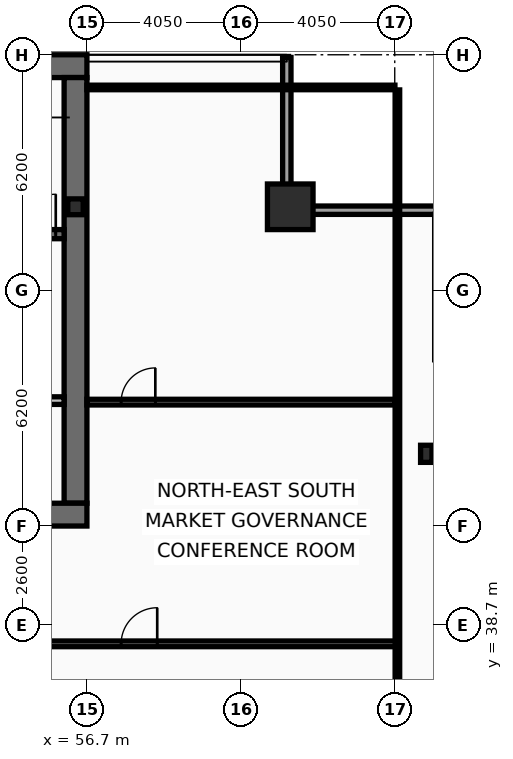
"""IFC4 building model, lengths in metres.
Left out: names, types, materials, properties, quantities, classifications, styles, units other than length and angle.
Written with IfcOpenShell. Run it as: python <this file> out.ifc"""

import sys

from ifc_helpers import new_model, si_unit, direction, frame, frame_2d, origin, origin_2d, place, context, subcontext, project, spatial, rectangle, hollow_rectangle, i_section, extrude, element, fill, save


model = new_model("IFC4")
c1 = context("Model", 3, precision=1e-05, world=origin(), true_north=direction((0.0, 1.0)))
c2 = subcontext(c1, "Body", "Model", "MODEL_VIEW")
j1 = project(units=[si_unit("LENGTHUNIT", "METRE"), si_unit("PLANEANGLEUNIT", "RADIAN")], contexts=[c1])
p1 = place(None, origin())
s1 = spatial("IfcSite", under=j1, at=p1, CompositionType="ELEMENT")
p2 = place(p1, origin())
s2 = spatial("IfcBuilding", under=s1, at=p2, CompositionType="ELEMENT")
p3 = place(p2, frame((0.0, 0.0, 228.2)))
s3 = spatial("IfcBuildingStorey", under=s2, at=p3, CompositionType="ELEMENT", Elevation=228.2)
p4 = place(p3, frame((16.2, 53.4, 0.0), z_axis=(0.0, 0.0, 1.0), x_axis=(1.0, 0.0, 0.0)))
e1 = element("IfcWall", 1, at=p4, inside=s3, PredefinedType="SHEAR", context=c2, shape_type="SweptSolid", body=[
    extrude(rectangle(XDim=40.5, YDim=0.6, at=frame_2d((20.25, 0.0))), origin(), (0.0, 0.0, 1.0), 3.44),
])
p5 = place(p3, frame((56.4, 53.1, 0.0), z_axis=(0.0, 0.0, 1.0), x_axis=(0.0, -1.0, 0.0)))
e2 = element("IfcWall", 2, at=p5, inside=s3, PredefinedType="SHEAR", context=c2, shape_type="SweptSolid", body=[
    extrude(rectangle(XDim=11.2, YDim=0.6, at=frame_2d((5.6, 0.0))), origin(), (0.0, 0.0, 1.0), 3.44),
])
p6 = place(p3, frame((56.7, 41.6, 0.0), z_axis=(0.0, 0.0, 1.0), x_axis=(-1.0, 0.0, 0.0)))
e3 = element("IfcWall", 3, at=p6, inside=s3, PredefinedType="SHEAR", context=c2, shape_type="SweptSolid", body=[
    extrude(rectangle(XDim=2.45, YDim=0.6, at=frame_2d((1.225, 0.0))), origin(), (0.0, 0.0, 1.0), 3.44),
])
p7 = place(p3, frame((48.63, 48.98, 0.0), z_axis=(0.0, 0.0, 1.0), x_axis=(1.0, 0.0, 0.0)))
e4 = element("IfcWall", 4, at=p7, inside=s3, PredefinedType="SHEAR", context=c2, shape_type="SweptSolid", body=[
    extrude(rectangle(XDim=7.47, YDim=0.24, at=frame_2d((3.735, 0.0))), origin(), (0.0, 0.0, 1.0), 3.44),
])
p8 = place(p7, frame((6.2, 0.0, 0.0)))
e5 = element("IfcOpeningElement", 5, at=p8, cuts=e4, PredefinedType="OPENING", context=c2, shape_type="SweptSolid", body=[
    extrude(rectangle(XDim=1.05, YDim=2.15, at=frame_2d((0.525, 1.075))), frame((0.0, 0.13, 0.0), z_axis=(0.0, -1.0, 0.0), x_axis=(1.0, 0.0, 0.0)), (0.0, 0.0, 1.0), 0.26),
])
p9 = place(p3, frame((62.05, 49.7, 0.0), z_axis=(0.0, 0.0, 1.0), x_axis=(1.0, 0.0, 0.0)))
e6 = element("IfcColumn", 6, at=p9, inside=s3, PredefinedType="COLUMN", context=c2, shape_type="SweptSolid", body=[
    extrude(hollow_rectangle(XDim=1.2, YDim=1.2, WallThickness=0.06, at=origin_2d()), origin(), (0.0, 0.0, 1.0), 3.6),
])
p10 = place(p3, frame((65.63, 43.2, 0.0), z_axis=(0.0, 0.0, 1.0), x_axis=(1.0, 0.0, 0.0)))
e7 = element("IfcColumn", 7, at=p10, inside=s3, PredefinedType="COLUMN", context=c2, shape_type="SweptSolid", body=[
    extrude(i_section(OverallWidth=0.3, OverallDepth=0.45, WebThickness=0.014, FlangeThickness=0.026, at=origin_2d()), origin(), (0.0, 0.0, 1.0), 3.6),
])
p11 = place(p3, frame((56.4, 49.7, 0.0), z_axis=(0.0, 0.0, 1.0), x_axis=(1.0, 0.0, 0.0)))
e8 = element("IfcColumn", 8, at=p11, inside=s3, PredefinedType="COLUMN", context=c2, shape_type="SweptSolid", body=[
    extrude(i_section(OverallWidth=0.406, OverallDepth=0.416, WebThickness=0.03, FlangeThickness=0.048, at=origin_2d()), origin(), (0.0, 0.0, 1.0), 3.6),
])
p12 = place(p3, frame((61.96, 53.63, 0.0), z_axis=(0.0, 0.0, 1.0), x_axis=(0.0, -1.0, 0.0)))
e9 = element("IfcWall", 9, at=p12, inside=s3, PredefinedType="SOLIDWALL", context=c2, shape_type="SweptSolid", body=[
    extrude(rectangle(XDim=3.91, YDim=0.22, at=frame_2d((1.955, 0.0))), origin(), (0.0, 0.0, 1.0), 2.83),
])
p13 = place(p3, frame((61.85, 49.61, 0.0), z_axis=(0.0, 0.0, 1.0), x_axis=(1.0, 0.0, 0.0)))
e10 = element("IfcWall", 10, at=p13, inside=s3, PredefinedType="SOLIDWALL", context=c2, shape_type="SweptSolid", body=[
    extrude(rectangle(XDim=4.22, YDim=0.22, at=frame_2d((2.11, 0.0))), origin(), (0.0, 0.0, 1.0), 2.83),
])
p14 = place(p3, frame((51.9, 44.6, 0.0), z_axis=(0.0, 0.0, 1.0), x_axis=(1.0, 0.0, 0.0)))
e11 = element("IfcWall", 11, at=p14, inside=s3, PredefinedType="PARTITIONING", context=c2, shape_type="SweptSolid", body=[
    extrude(rectangle(XDim=4.2, YDim=0.2, at=frame_2d((2.1, 0.0))), origin(), (0.0, 0.0, 1.0), 3.44),
])
p15 = place(p14, frame((1.15, 0.0, 0.0)))
e12 = element("IfcOpeningElement", 12, at=p15, cuts=e11, PredefinedType="OPENING", context=c2, shape_type="SweptSolid", body=[
    extrude(rectangle(XDim=1.05, YDim=2.15, at=frame_2d((0.525, 1.075))), frame((0.0, 0.11, 0.0), z_axis=(0.0, -1.0, 0.0), x_axis=(1.0, 0.0, 0.0)), (0.0, 0.0, 1.0), 0.22),
])
p16 = place(p3, frame((54.35, 38.2, 0.0), z_axis=(0.0, 0.0, 1.0), x_axis=(1.0, 0.0, 0.0)))
e13 = element("IfcWall", 13, at=p16, inside=s3, PredefinedType="PARTITIONING", context=c2, shape_type="SweptSolid", body=[
    extrude(rectangle(XDim=10.52, YDim=0.15, at=frame_2d((5.26, 0.0))), origin(), (0.0, 0.0, 1.0), 2.78),
])
p17 = place(p16, frame((3.25, 0.0, 0.0)))
e14 = element("IfcOpeningElement", 14, at=p17, cuts=e13, PredefinedType="OPENING", context=c2, shape_type="SweptSolid", body=[
    extrude(rectangle(XDim=0.95, YDim=2.05, at=frame_2d((0.475, 1.025))), frame((0.0, 0.085, 0.0), z_axis=(0.0, -1.0, 0.0), x_axis=(1.0, 0.0, 0.0)), (0.0, 0.0, 1.0), 0.17),
])
p18 = place(p3, frame((56.7, 44.56, 0.0), z_axis=(0.0, 0.0, 1.0), x_axis=(1.0, 0.0, 0.0)))
e15 = element("IfcWall", 15, at=p18, inside=s3, PredefinedType="PARTITIONING", context=c2, shape_type="SweptSolid", body=[
    extrude(rectangle(XDim=8.105, YDim=0.15, at=frame_2d((4.052, 0.0))), origin(), (0.0, 0.0, 1.0), 2.83),
])
p19 = place(p18, frame((0.9, 0.0, 0.0)))
e16 = element("IfcOpeningElement", 16, at=p19, cuts=e15, PredefinedType="OPENING", context=c2, shape_type="SweptSolid", body=[
    extrude(rectangle(XDim=0.9, YDim=2.05, at=frame_2d((0.45, 1.025))), frame((0.0, 0.085, 0.0), z_axis=(0.0, -1.0, 0.0), x_axis=(1.0, 0.0, 0.0)), (0.0, 0.0, 1.0), 0.17),
])
p20 = place(p3, frame((64.87, 10.665, 0.0), z_axis=(0.0, 0.0, 1.0), x_axis=(0.0, 1.0, 0.0)))
e17 = element("IfcWall", 17, at=p20, inside=s3, PredefinedType="PARTITIONING", context=c2, shape_type="SweptSolid", body=[
    extrude(rectangle(XDim=42.11, YDim=0.12, at=frame_2d((21.055, 0.0))), origin(), (0.0, 0.0, 1.0), 2.78),
])
p21 = place(p3, frame((56.7, 52.84, 0.0), z_axis=(0.0, 0.0, 1.0), x_axis=(1.0, 0.0, 0.0)))
e18 = element("IfcWall", 18, at=p21, inside=s3, PredefinedType="PARTITIONING", context=c2, shape_type="SweptSolid", body=[
    extrude(rectangle(XDim=8.105, YDim=0.12, at=frame_2d((4.052, 0.0))), origin(), (0.0, 0.0, 1.0), 3.44),
])
p22 = place(p8, origin())
e19 = element("IfcDoor", 19, at=p22, inside=s3, OperationType="SINGLE_SWING_RIGHT", PredefinedType="DOOR", context=c2, shape_type="SweptSolid", body=[
    extrude(rectangle(XDim=1.05, YDim=2.15, at=frame_2d((0.525, 1.075))), frame((0.0, 0.025, 0.0), z_axis=(0.0, -1.0, 0.0), x_axis=(1.0, 0.0, 0.0)), (0.0, 0.0, 1.0), 0.05),
])
fill(e5, e19)
p23 = place(p17, origin())
e20 = element("IfcDoor", 20, at=p23, inside=s3, OperationType="SINGLE_SWING_RIGHT", PredefinedType="DOOR", context=c2, shape_type="SweptSolid", body=[
    extrude(rectangle(XDim=0.95, YDim=2.05, at=frame_2d((0.475, 1.025))), frame((0.0, 0.025, 0.0), z_axis=(0.0, -1.0, 0.0), x_axis=(1.0, 0.0, 0.0)), (0.0, 0.0, 1.0), 0.05),
])
fill(e14, e20)
p24 = place(p19, origin())
e21 = element("IfcDoor", 21, at=p24, inside=s3, OperationType="SINGLE_SWING_RIGHT", PredefinedType="DOOR", context=c2, shape_type="SweptSolid", body=[
    extrude(rectangle(XDim=0.9, YDim=2.05, at=frame_2d((0.45, 1.025))), frame((0.0, 0.025, 0.0), z_axis=(0.0, -1.0, 0.0), x_axis=(1.0, 0.0, 0.0)), (0.0, 0.0, 1.0), 0.05),
])
fill(e16, e21)
save(model, sys.argv[1])
